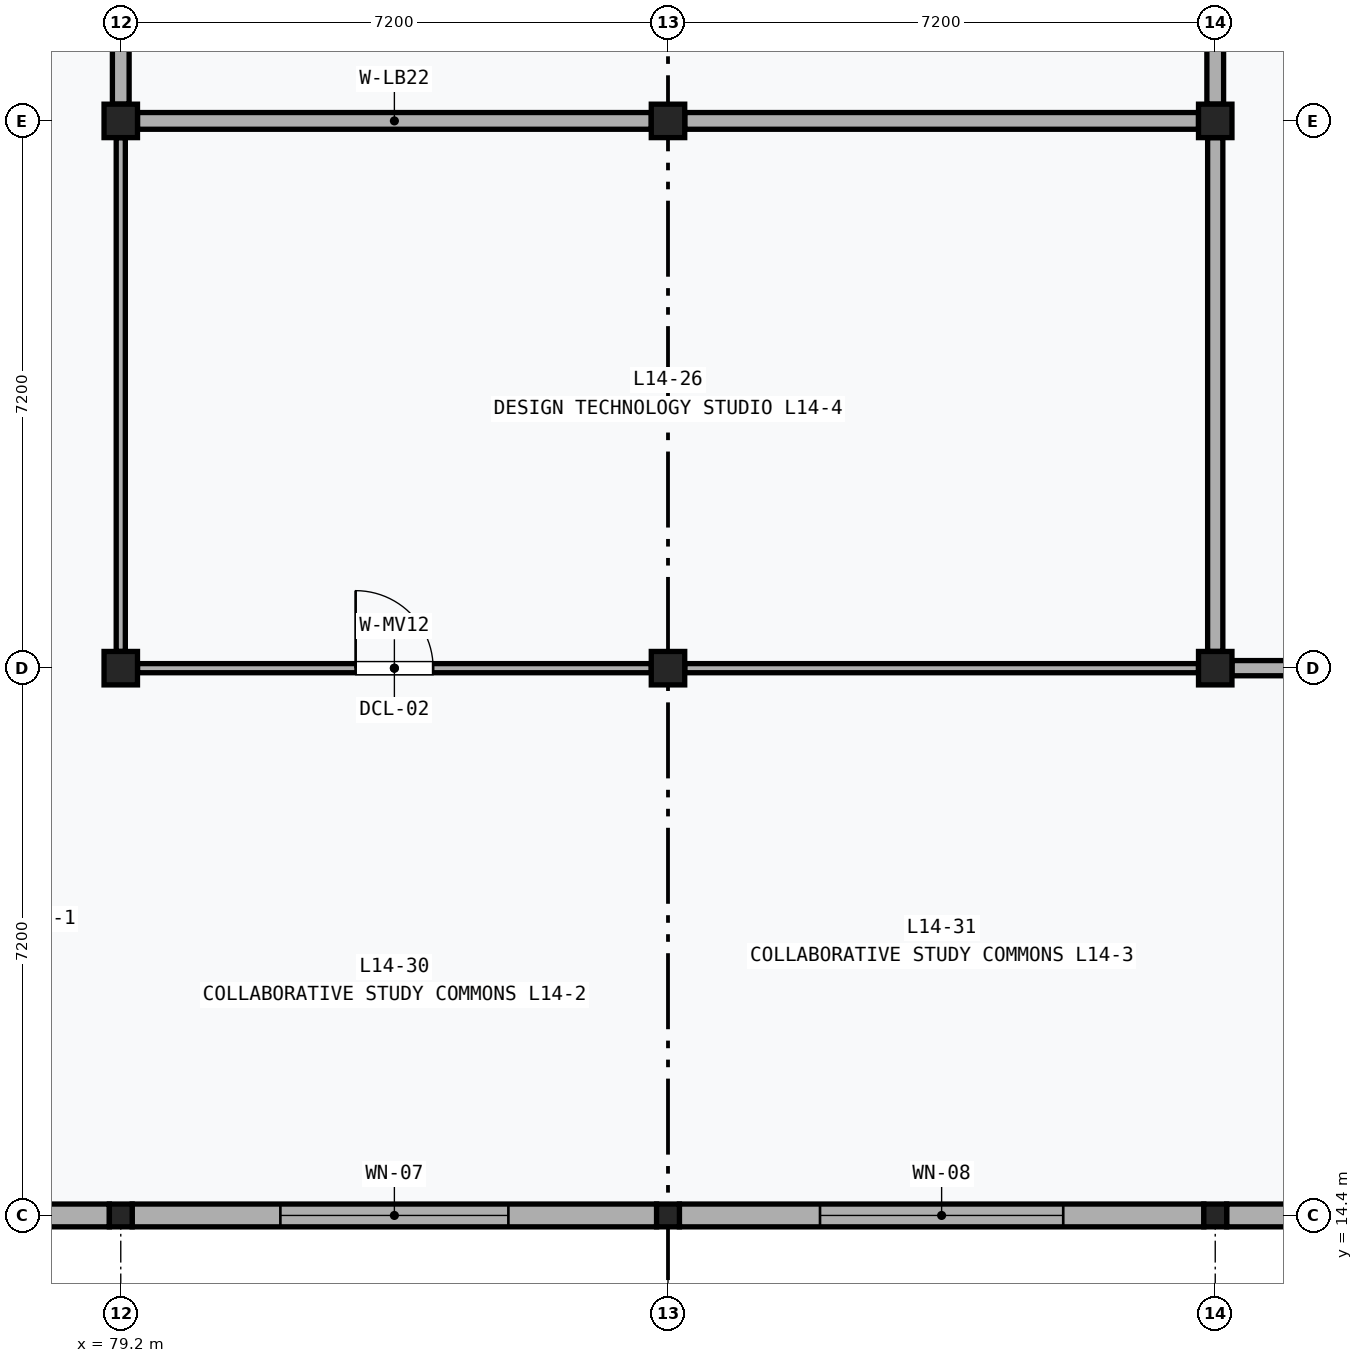
"""IFC4 building model, lengths in metres.
Left out: names, types, materials, properties, quantities, classifications, styles, units other than length and angle.
Written with IfcOpenShell. Run it as: python <this file> out.ifc"""

import sys

from ifc_helpers import new_model, si_unit, direction, frame, frame_2d, origin, origin_2d, place, context, subcontext, project, spatial, rectangle, extrude, element, fill, save


model = new_model("IFC4")
c1 = context("Model", 3, precision=1e-05, world=origin(), true_north=direction((0.0, 1.0)))
c2 = subcontext(c1, "Body", "Model", "MODEL_VIEW")
j1 = project(units=[si_unit("LENGTHUNIT", "METRE"), si_unit("PLANEANGLEUNIT", "RADIAN")], contexts=[c1])
p1 = place(None, origin())
s1 = spatial("IfcSite", under=j1, at=p1, CompositionType="ELEMENT")
p2 = place(p1, origin())
s2 = spatial("IfcBuilding", under=s1, at=p2, CompositionType="ELEMENT")
p3 = place(p2, frame((0.0, 0.0, 59.0)))
s3 = spatial("IfcBuildingStorey", under=s2, at=p3, CompositionType="ELEMENT", Elevation=59.0)
p4 = place(p3, frame((79.2, 14.4, 0.0), z_axis=(0.0, 0.0, 1.0), x_axis=(1.0, 0.0, 0.0)))
e1 = element("IfcColumn", 1, at=p4, inside=s3, PredefinedType="COLUMN", context=c2, shape_type="SweptSolid", body=[
    extrude(rectangle(XDim=0.3, YDim=0.3, at=origin_2d()), origin(), (0.0, 0.0, 1.0), 4.0),
])
for number, where, z_axis, x_axis in (
    (2, (79.2, 21.6, 0.0), (0.0, 0.0, 1.0), (1.0, 0.0, 0.0)),
    (3, (79.2, 28.8, 0.0), (0.0, 0.0, 1.0), (1.0, 0.0, 0.0)),
):
    element("IfcColumn", number, at=place(p3, frame(where, z_axis=z_axis, x_axis=x_axis)), inside=s3, PredefinedType="COLUMN", context=c2, shape_type="SweptSolid", body=[
        extrude(rectangle(XDim=0.44, YDim=0.44, at=origin_2d()), origin(), (0.0, 0.0, 1.0), 4.0),
    ])
p5 = place(p3, frame((86.4, 14.4, 0.0), z_axis=(0.0, 0.0, 1.0), x_axis=(1.0, 0.0, 0.0)))
e4 = element("IfcColumn", 4, at=p5, inside=s3, PredefinedType="COLUMN", context=c2, shape_type="SweptSolid", body=[
    extrude(rectangle(XDim=0.3, YDim=0.3, at=origin_2d()), origin(), (0.0, 0.0, 1.0), 4.0),
])
for number, where, z_axis, x_axis in (
    (5, (86.4, 21.6, 0.0), (0.0, 0.0, 1.0), (1.0, 0.0, 0.0)),
    (6, (86.4, 28.8, 0.0), (0.0, 0.0, 1.0), (1.0, 0.0, 0.0)),
):
    element("IfcColumn", number, at=place(p3, frame(where, z_axis=z_axis, x_axis=x_axis)), inside=s3, PredefinedType="COLUMN", context=c2, shape_type="SweptSolid", body=[
        extrude(rectangle(XDim=0.44, YDim=0.44, at=origin_2d()), origin(), (0.0, 0.0, 1.0), 4.0),
    ])
p6 = place(p3, frame((93.6, 14.4, 0.0), z_axis=(0.0, 0.0, 1.0), x_axis=(1.0, 0.0, 0.0)))
e7 = element("IfcColumn", 7, at=p6, inside=s3, PredefinedType="COLUMN", context=c2, shape_type="SweptSolid", body=[
    extrude(rectangle(XDim=0.3, YDim=0.3, at=origin_2d()), origin(), (0.0, 0.0, 1.0), 4.0),
])
for number, where, z_axis, x_axis in (
    (8, (93.6, 21.6, 0.0), (0.0, 0.0, 1.0), (1.0, 0.0, 0.0)),
    (9, (93.6, 28.8, 0.0), (0.0, 0.0, 1.0), (1.0, 0.0, 0.0)),
):
    element("IfcColumn", number, at=place(p3, frame(where, z_axis=z_axis, x_axis=x_axis)), inside=s3, PredefinedType="COLUMN", context=c2, shape_type="SweptSolid", body=[
        extrude(rectangle(XDim=0.44, YDim=0.44, at=origin_2d()), origin(), (0.0, 0.0, 1.0), 4.0),
    ])
p7 = place(p3, frame((72.18, 14.4, 0.0), z_axis=(0.0, 0.0, 1.0), x_axis=(1.0, 0.0, 0.0)))
e10 = element("IfcWall", 10, at=p7, inside=s3, PredefinedType="SOLIDWALL", context=c2, shape_type="SweptSolid", body=[
    extrude(rectangle(XDim=6.87, YDim=0.3, at=frame_2d((3.435, 0.0))), origin(), (0.0, 0.0, 1.0), 3.19),
])
p8 = place(p7, frame((2.035, 0.0, 0.9)))
e11 = element("IfcOpeningElement", 11, at=p8, cuts=e10, PredefinedType="OPENING", context=c2, shape_type="SweptSolid", body=[
    extrude(rectangle(XDim=2.8, YDim=1.8, at=frame_2d((1.4, 0.9))), frame((0.0, 0.162, 0.0), z_axis=(0.0, -1.0, 0.0), x_axis=(1.0, 0.0, 0.0)), (0.0, 0.0, 1.0), 0.324),
])
p9 = place(p3, frame((79.35, 14.4, 0.0), z_axis=(0.0, 0.0, 1.0), x_axis=(1.0, 0.0, 0.0)))
e12 = element("IfcWall", 12, at=p9, inside=s3, PredefinedType="SOLIDWALL", context=c2, shape_type="SweptSolid", body=[
    extrude(rectangle(XDim=6.9, YDim=0.3, at=frame_2d((3.45, 0.0))), origin(), (0.0, 0.0, 1.0), 3.19),
])
p10 = place(p9, frame((1.95, 0.0, 0.9)))
e13 = element("IfcOpeningElement", 13, at=p10, cuts=e12, PredefinedType="OPENING", context=c2, shape_type="SweptSolid", body=[
    extrude(rectangle(XDim=3.0, YDim=1.8, at=frame_2d((1.5, 0.9))), frame((0.0, 0.162, 0.0), z_axis=(0.0, -1.0, 0.0), x_axis=(1.0, 0.0, 0.0)), (0.0, 0.0, 1.0), 0.324),
])
p11 = place(p3, frame((86.55, 14.4, 0.0), z_axis=(0.0, 0.0, 1.0), x_axis=(1.0, 0.0, 0.0)))
e14 = element("IfcWall", 14, at=p11, inside=s3, PredefinedType="SOLIDWALL", context=c2, shape_type="SweptSolid", body=[
    extrude(rectangle(XDim=6.9, YDim=0.3, at=frame_2d((3.45, 0.0))), origin(), (0.0, 0.0, 1.0), 3.19),
])
p12 = place(p11, frame((1.85, 0.0, 0.9)))
e15 = element("IfcOpeningElement", 15, at=p12, cuts=e14, PredefinedType="OPENING", context=c2, shape_type="SweptSolid", body=[
    extrude(rectangle(XDim=3.2, YDim=1.8, at=frame_2d((1.6, 0.9))), frame((0.0, 0.162, 0.0), z_axis=(0.0, -1.0, 0.0), x_axis=(1.0, 0.0, 0.0)), (0.0, 0.0, 1.0), 0.324),
])
p13 = place(p3, frame((93.75, 14.4, 0.0), z_axis=(0.0, 0.0, 1.0), x_axis=(1.0, 0.0, 0.0)))
e16 = element("IfcWall", 16, at=p13, inside=s3, PredefinedType="SOLIDWALL", context=c2, shape_type="SweptSolid", body=[
    extrude(rectangle(XDim=6.87, YDim=0.3, at=frame_2d((3.435, 0.0))), origin(), (0.0, 0.0, 1.0), 3.19),
])
p14 = place(p13, frame((1.735, 0.0, 0.9)))
e17 = element("IfcOpeningElement", 17, at=p14, cuts=e16, PredefinedType="OPENING", context=c2, shape_type="SweptSolid", body=[
    extrude(rectangle(XDim=3.4, YDim=1.8, at=frame_2d((1.7, 0.9))), frame((0.0, 0.162, 0.0), z_axis=(0.0, -1.0, 0.0), x_axis=(1.0, 0.0, 0.0)), (0.0, 0.0, 1.0), 0.324),
])
p15 = place(p3, frame((79.42, 28.8, 0.0), z_axis=(0.0, 0.0, 1.0), x_axis=(1.0, 0.0, 0.0)))
e18 = element("IfcWall", 18, at=p15, inside=s3, PredefinedType="PARTITIONING", context=c2, shape_type="SweptSolid", body=[
    extrude(rectangle(XDim=6.76, YDim=0.22, at=frame_2d((3.38, 0.0))), origin(), (0.0, 0.0, 1.0), 3.11),
])
p16 = place(p3, frame((79.2, 29.02, 0.0), z_axis=(0.0, 0.0, 1.0), x_axis=(0.0, 1.0, 0.0)))
e19 = element("IfcWall", 19, at=p16, inside=s3, PredefinedType="PARTITIONING", context=c2, shape_type="SweptSolid", body=[
    extrude(rectangle(XDim=6.76, YDim=0.22, at=frame_2d((3.38, 0.0))), origin(), (0.0, 0.0, 1.0), 3.11),
])
p17 = place(p16, frame((2.8, 0.0, 0.0)))
e20 = element("IfcOpeningElement", 20, at=p17, cuts=e19, PredefinedType="OPENING", context=c2, shape_type="SweptSolid", body=[
    extrude(rectangle(XDim=1.16, YDim=2.22, at=frame_2d((0.58, 1.11))), frame((0.0, 0.122, 0.0), z_axis=(0.0, -1.0, 0.0), x_axis=(1.0, 0.0, 0.0)), (0.0, 0.0, 1.0), 0.244),
])
p18 = place(p3, frame((86.62, 28.8, 0.0), z_axis=(0.0, 0.0, 1.0), x_axis=(1.0, 0.0, 0.0)))
e21 = element("IfcWall", 21, at=p18, inside=s3, PredefinedType="PARTITIONING", context=c2, shape_type="SweptSolid", body=[
    extrude(rectangle(XDim=6.76, YDim=0.22, at=frame_2d((3.38, 0.0))), origin(), (0.0, 0.0, 1.0), 3.11),
])
p19 = place(p3, frame((93.6, 29.02, 0.0), z_axis=(0.0, 0.0, 1.0), x_axis=(0.0, 1.0, 0.0)))
e22 = element("IfcWall", 22, at=p19, inside=s3, PredefinedType="PARTITIONING", context=c2, shape_type="SweptSolid", body=[
    extrude(rectangle(XDim=6.76, YDim=0.22, at=frame_2d((3.38, 0.0))), origin(), (0.0, 0.0, 1.0), 3.11),
])
p20 = place(p3, frame((93.82, 21.6, 0.0), z_axis=(0.0, 0.0, 1.0), x_axis=(1.0, 0.0, 0.0)))
e23 = element("IfcWall", 23, at=p20, inside=s3, PredefinedType="PARTITIONING", context=c2, shape_type="SweptSolid", body=[
    extrude(rectangle(XDim=6.76, YDim=0.2, at=frame_2d((3.38, 0.0))), origin(), (0.0, 0.0, 1.0), 3.11),
])
p21 = place(p20, frame((2.76, 0.0, 0.0)))
e24 = element("IfcOpeningElement", 24, at=p21, cuts=e23, PredefinedType="OPENING", context=c2, shape_type="SweptSolid", body=[
    extrude(rectangle(XDim=1.24, YDim=2.26, at=frame_2d((0.62, 1.13))), frame((0.0, 0.112, 0.0), z_axis=(0.0, -1.0, 0.0), x_axis=(1.0, 0.0, 0.0)), (0.0, 0.0, 1.0), 0.224),
])
p22 = place(p3, frame((93.6, 21.82, 0.0), z_axis=(0.0, 0.0, 1.0), x_axis=(0.0, 1.0, 0.0)))
e25 = element("IfcWall", 25, at=p22, inside=s3, PredefinedType="PARTITIONING", context=c2, shape_type="SweptSolid", body=[
    extrude(rectangle(XDim=6.76, YDim=0.2, at=frame_2d((3.38, 0.0))), origin(), (0.0, 0.0, 1.0), 3.11),
])
p23 = place(p3, frame((79.42, 21.6, 0.0), z_axis=(0.0, 0.0, 1.0), x_axis=(1.0, 0.0, 0.0)))
e26 = element("IfcWall", 26, at=p23, inside=s3, PredefinedType="MOVABLE", context=c2, shape_type="SweptSolid", body=[
    extrude(rectangle(XDim=6.76, YDim=0.12, at=frame_2d((3.38, 0.0))), origin(), (0.0, 0.0, 1.0), 3.11),
])
p24 = place(p23, frame((2.87, 0.0, 0.0)))
e27 = element("IfcOpeningElement", 27, at=p24, cuts=e26, PredefinedType="OPENING", context=c2, shape_type="SweptSolid", body=[
    extrude(rectangle(XDim=1.02, YDim=2.12, at=frame_2d((0.51, 1.06))), frame((0.0, 0.072, 0.0), z_axis=(0.0, -1.0, 0.0), x_axis=(1.0, 0.0, 0.0)), (0.0, 0.0, 1.0), 0.144),
])
p25 = place(p3, frame((79.2, 21.82, 0.0), z_axis=(0.0, 0.0, 1.0), x_axis=(0.0, 1.0, 0.0)))
e28 = element("IfcWall", 28, at=p25, inside=s3, PredefinedType="MOVABLE", context=c2, shape_type="SweptSolid", body=[
    extrude(rectangle(XDim=6.76, YDim=0.12, at=frame_2d((3.38, 0.0))), origin(), (0.0, 0.0, 1.0), 3.11),
])
p26 = place(p3, frame((86.62, 21.6, 0.0), z_axis=(0.0, 0.0, 1.0), x_axis=(1.0, 0.0, 0.0)))
e29 = element("IfcWall", 29, at=p26, inside=s3, PredefinedType="MOVABLE", context=c2, shape_type="SweptSolid", body=[
    extrude(rectangle(XDim=6.76, YDim=0.12, at=frame_2d((3.38, 0.0))), origin(), (0.0, 0.0, 1.0), 3.11),
])
p27 = place(p10, origin())
e30 = element("IfcWindow", 30, at=p27, inside=s3, PartitioningType="SINGLE_PANEL", PredefinedType="WINDOW", context=c2, shape_type="SweptSolid", body=[
    extrude(rectangle(XDim=3.0, YDim=1.8, at=frame_2d((1.5, 0.9))), frame((0.0, 0.03, 0.0), z_axis=(0.0, -1.0, 0.0), x_axis=(1.0, 0.0, 0.0)), (0.0, 0.0, 1.0), 0.06),
])
fill(e13, e30)
p28 = place(p12, origin())
e31 = element("IfcWindow", 31, at=p28, inside=s3, PartitioningType="SINGLE_PANEL", PredefinedType="WINDOW", context=c2, shape_type="SweptSolid", body=[
    extrude(rectangle(XDim=3.2, YDim=1.8, at=frame_2d((1.6, 0.9))), frame((0.0, 0.03, 0.0), z_axis=(0.0, -1.0, 0.0), x_axis=(1.0, 0.0, 0.0)), (0.0, 0.0, 1.0), 0.06),
])
fill(e15, e31)
p29 = place(p24, origin())
e32 = element("IfcDoor", 32, at=p29, inside=s3, OperationType="SINGLE_SWING_LEFT", PredefinedType="DOOR", context=c2, shape_type="SweptSolid", body=[
    extrude(rectangle(XDim=1.02, YDim=2.12, at=frame_2d((0.51, 1.06))), frame((0.0, 0.025, 0.0), z_axis=(0.0, -1.0, 0.0), x_axis=(1.0, 0.0, 0.0)), (0.0, 0.0, 1.0), 0.05),
])
fill(e27, e32)
save(model, sys.argv[1])
